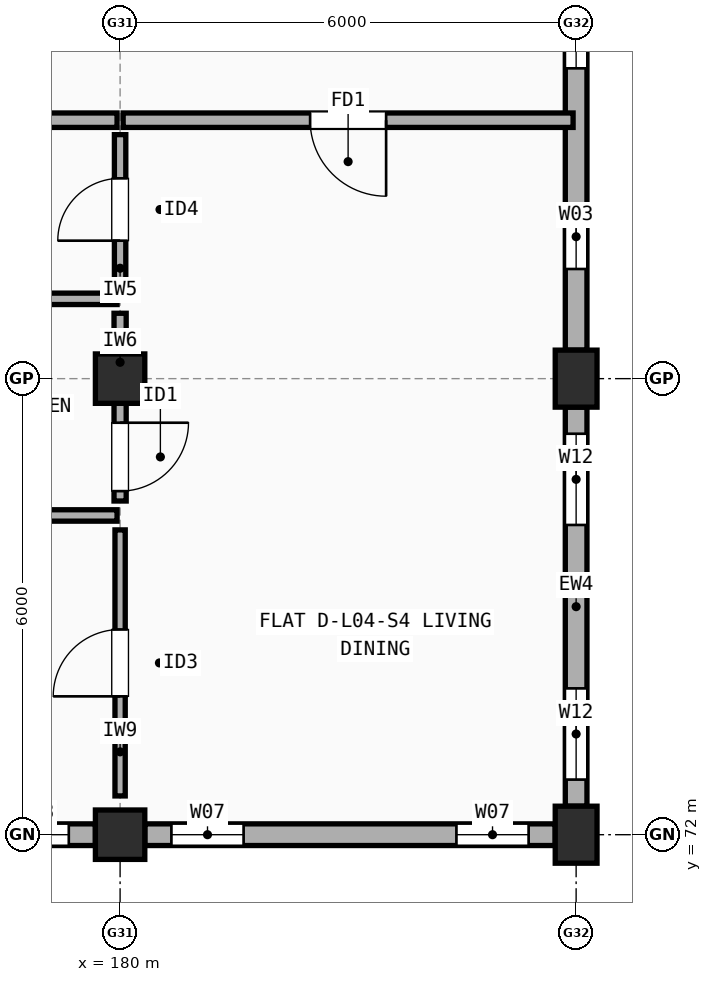
"""IFC4 building model, lengths in metres.
Left out: names, types, materials, properties, quantities, classifications, styles, units other than length and angle.
Written with IfcOpenShell. Run it as: python <this file> out.ifc"""

import sys

from ifc_helpers import new_model, si_unit, direction, frame, frame_2d, origin, origin_2d, place, context, subcontext, project, spatial, rectangle, extrude, element, fill, save


model = new_model("IFC4")
c1 = context("Model", 3, precision=1e-05, world=origin(), true_north=direction((0.0, 1.0)))
c2 = subcontext(c1, "Body", "Model", "MODEL_VIEW")
j1 = project(units=[si_unit("LENGTHUNIT", "METRE"), si_unit("PLANEANGLEUNIT", "RADIAN")], contexts=[c1])
p1 = place(None, origin())
s1 = spatial("IfcSite", under=j1, at=p1, CompositionType="ELEMENT")
p2 = place(p1, origin())
s2 = spatial("IfcBuilding", under=s1, at=p2, CompositionType="ELEMENT")
p3 = place(p2, frame((0.0, 0.0, 14.1)))
s3 = spatial("IfcBuildingStorey", under=s2, at=p3, CompositionType="ELEMENT", Elevation=14.1)
for number, where, z_axis, x_axis in (
    (1, (180.0, 72.0, 0.0), (0.0, 0.0, 1.0), (1.0, 0.0, 0.0)),
    (2, (180.0, 78.0, 0.0), (0.0, 0.0, 1.0), (1.0, 0.0, 0.0)),
):
    element("IfcColumn", number, at=place(p3, frame(where, z_axis=z_axis, x_axis=x_axis)), inside=s3, PredefinedType="COLUMN", context=c2, shape_type="SweptSolid", body=[
        extrude(rectangle(XDim=0.65, YDim=0.65, at=origin_2d()), origin(), (0.0, 0.0, 1.0), 2.95),
    ])
for number, where, z_axis, x_axis in (
    (3, (186.0, 72.0, 0.0), (0.0, 0.0, 1.0), (1.0, 0.0, 0.0)),
    (4, (186.0, 78.0, 0.0), (0.0, 0.0, 1.0), (1.0, 0.0, 0.0)),
):
    element("IfcColumn", number, at=place(p3, frame(where, z_axis=z_axis, x_axis=x_axis)), inside=s3, PredefinedType="COLUMN", context=c2, shape_type="SweptSolid", body=[
        extrude(rectangle(XDim=0.55, YDim=0.75, at=origin_2d()), origin(), (0.0, 0.0, 1.0), 2.95),
    ])
p4 = place(p3, frame((174.325, 72.0, 0.0), z_axis=(0.0, 0.0, 1.0), x_axis=(1.0, 0.0, 0.0)))
e5 = element("IfcWall", 5, at=p4, inside=s3, PredefinedType="STANDARD", context=c2, shape_type="SweptSolid", body=[
    extrude(rectangle(XDim=5.35, YDim=0.285, at=frame_2d((2.675, 0.0))), origin(), (0.0, 0.0, 1.0), 2.432),
])
p5 = place(p4, frame((1.565, 0.0, 0.9)))
e6 = element("IfcOpeningElement", 6, at=p5, cuts=e5, PredefinedType="OPENING", context=c2, shape_type="SweptSolid", body=[
    extrude(rectangle(XDim=0.85, YDim=1.25, at=frame_2d((0.425, 0.625))), frame((0.0, 0.152, 0.0), z_axis=(0.0, -1.0, 0.0), x_axis=(1.0, 0.0, 0.0)), (0.0, 0.0, 1.0), 0.305),
])
p6 = place(p4, frame((4.15, 0.0, 0.9)))
e7 = element("IfcOpeningElement", 7, at=p6, cuts=e5, PredefinedType="OPENING", context=c2, shape_type="SweptSolid", body=[
    extrude(rectangle(XDim=0.85, YDim=1.25, at=frame_2d((0.425, 0.625))), frame((0.0, 0.152, 0.0), z_axis=(0.0, -1.0, 0.0), x_axis=(1.0, 0.0, 0.0)), (0.0, 0.0, 1.0), 0.305),
])
p7 = place(p3, frame((180.325, 72.0, 0.0), z_axis=(0.0, 0.0, 1.0), x_axis=(1.0, 0.0, 0.0)))
e8 = element("IfcWall", 8, at=p7, inside=s3, PredefinedType="STANDARD", context=c2, shape_type="SweptSolid", body=[
    extrude(rectangle(XDim=5.4, YDim=0.285, at=frame_2d((2.7, 0.0))), origin(), (0.0, 0.0, 1.0), 2.432),
])
p8 = place(p7, frame((0.35, 0.0, 0.9)))
e9 = element("IfcOpeningElement", 9, at=p8, cuts=e8, PredefinedType="OPENING", context=c2, shape_type="SweptSolid", body=[
    extrude(rectangle(XDim=0.95, YDim=1.35, at=frame_2d((0.475, 0.675))), frame((0.0, 0.152, 0.0), z_axis=(0.0, -1.0, 0.0), x_axis=(1.0, 0.0, 0.0)), (0.0, 0.0, 1.0), 0.305),
])
p9 = place(p7, frame((4.1, 0.0, 0.9)))
e10 = element("IfcOpeningElement", 10, at=p9, cuts=e8, PredefinedType="OPENING", context=c2, shape_type="SweptSolid", body=[
    extrude(rectangle(XDim=0.95, YDim=1.35, at=frame_2d((0.475, 0.675))), frame((0.0, 0.152, 0.0), z_axis=(0.0, -1.0, 0.0), x_axis=(1.0, 0.0, 0.0)), (0.0, 0.0, 1.0), 0.305),
])
p10 = place(p3, frame((186.0, 72.375, 0.0), z_axis=(0.0, 0.0, 1.0), x_axis=(0.0, 1.0, 0.0)))
e11 = element("IfcWall", 11, at=p10, inside=s3, PredefinedType="STANDARD", context=c2, shape_type="SweptSolid", body=[
    extrude(rectangle(XDim=5.25, YDim=0.285, at=frame_2d((2.625, 0.0))), origin(), (0.0, 0.0, 1.0), 2.432),
])
p11 = place(p10, frame((0.35, 0.0, 0.9)))
e12 = element("IfcOpeningElement", 12, at=p11, cuts=e11, PredefinedType="OPENING", context=c2, shape_type="SweptSolid", body=[
    extrude(rectangle(XDim=1.2, YDim=1.35, at=frame_2d((0.6, 0.675))), frame((0.0, 0.152, 0.0), z_axis=(0.0, -1.0, 0.0), x_axis=(1.0, 0.0, 0.0)), (0.0, 0.0, 1.0), 0.305),
])
p12 = place(p10, frame((3.7, 0.0, 0.9)))
e13 = element("IfcOpeningElement", 13, at=p12, cuts=e11, PredefinedType="OPENING", context=c2, shape_type="SweptSolid", body=[
    extrude(rectangle(XDim=1.2, YDim=1.35, at=frame_2d((0.6, 0.675))), frame((0.0, 0.152, 0.0), z_axis=(0.0, -1.0, 0.0), x_axis=(1.0, 0.0, 0.0)), (0.0, 0.0, 1.0), 0.305),
])
p13 = place(p3, frame((186.0, 78.375, 0.0), z_axis=(0.0, 0.0, 1.0), x_axis=(0.0, 1.0, 0.0)))
e14 = element("IfcWall", 14, at=p13, inside=s3, PredefinedType="STANDARD", context=c2, shape_type="SweptSolid", body=[
    extrude(rectangle(XDim=5.25, YDim=0.285, at=frame_2d((2.625, 0.0))), origin(), (0.0, 0.0, 1.0), 2.432),
])
p14 = place(p13, frame((1.067, 0.0, 0.9)))
e15 = element("IfcOpeningElement", 15, at=p14, cuts=e14, PredefinedType="OPENING", context=c2, shape_type="SweptSolid", body=[
    extrude(rectangle(XDim=0.85, YDim=1.25, at=frame_2d((0.425, 0.625))), frame((0.0, 0.152, 0.0), z_axis=(0.0, -1.0, 0.0), x_axis=(1.0, 0.0, 0.0)), (0.0, 0.0, 1.0), 0.305),
])
p15 = place(p13, frame((3.708, 0.0, 0.9)))
e16 = element("IfcOpeningElement", 16, at=p15, cuts=e14, PredefinedType="OPENING", context=c2, shape_type="SweptSolid", body=[
    extrude(rectangle(XDim=0.9, YDim=1.3, at=frame_2d((0.45, 0.65))), frame((0.0, 0.152, 0.0), z_axis=(0.0, -1.0, 0.0), x_axis=(1.0, 0.0, 0.0)), (0.0, 0.0, 1.0), 0.305),
])
p16 = place(p3, frame((175.54, 81.4, 0.0), z_axis=(0.0, 0.0, 1.0), x_axis=(1.0, 0.0, 0.0)))
e17 = element("IfcWall", 17, at=p16, inside=s3, PredefinedType="SOLIDWALL", context=c2, shape_type="SweptSolid", body=[
    extrude(rectangle(XDim=4.42, YDim=0.19, at=frame_2d((2.21, 0.0))), origin(), (0.0, 0.0, 1.0), 2.458),
])
p17 = place(p3, frame((180.04, 81.4, 0.0), z_axis=(0.0, 0.0, 1.0), x_axis=(1.0, 0.0, 0.0)))
e18 = element("IfcWall", 18, at=p17, inside=s3, PredefinedType="SOLIDWALL", context=c2, shape_type="SweptSolid", body=[
    extrude(rectangle(XDim=5.92, YDim=0.19, at=frame_2d((2.96, 0.0))), origin(), (0.0, 0.0, 1.0), 2.432),
])
p18 = place(p17, frame((2.46, 0.0, 0.0)))
e19 = element("IfcOpeningElement", 19, at=p18, cuts=e18, PredefinedType="OPENING", context=c2, shape_type="SweptSolid", body=[
    extrude(rectangle(XDim=1.0, YDim=2.15, at=frame_2d((0.5, 1.075))), frame((0.0, 0.105, 0.0), z_axis=(0.0, -1.0, 0.0), x_axis=(1.0, 0.0, 0.0)), (0.0, 0.0, 1.0), 0.21),
])
p19 = place(p3, frame((180.0, 72.51, 0.0), z_axis=(0.0, 0.0, 1.0), x_axis=(0.0, 1.0, 0.0)))
e20 = element("IfcWall", 20, at=p19, inside=s3, PredefinedType="PARTITIONING", context=c2, shape_type="SweptSolid", body=[
    extrude(rectangle(XDim=3.5, YDim=0.135, at=frame_2d((1.75, 0.0))), origin(), (0.0, 0.0, 1.0), 2.508),
])
p20 = place(p19, frame((1.31, 0.0, 0.0)))
e21 = element("IfcOpeningElement", 21, at=p20, cuts=e20, PredefinedType="OPENING", context=c2, shape_type="SweptSolid", body=[
    extrude(rectangle(XDim=0.88, YDim=2.1, at=frame_2d((0.44, 1.05))), frame((0.0, 0.077, 0.0), z_axis=(0.0, -1.0, 0.0), x_axis=(1.0, 0.0, 0.0)), (0.0, 0.0, 1.0), 0.155),
])
p21 = place(p3, frame((180.0, 76.39, 0.0), z_axis=(0.0, 0.0, 1.0), x_axis=(0.0, 1.0, 0.0)))
e22 = element("IfcWall", 22, at=p21, inside=s3, PredefinedType="PLUMBINGWALL", context=c2, shape_type="SweptSolid", body=[
    extrude(rectangle(XDim=2.47, YDim=0.16, at=frame_2d((1.235, 0.0))), origin(), (0.0, 0.0, 1.0), 2.458),
])
p22 = place(p21, frame((0.13, 0.0, 0.0)))
e23 = element("IfcOpeningElement", 23, at=p22, cuts=e22, PredefinedType="OPENING", context=c2, shape_type="SweptSolid", body=[
    extrude(rectangle(XDim=0.9, YDim=2.1, at=frame_2d((0.45, 1.05))), frame((0.0, 0.09, 0.0), z_axis=(0.0, -1.0, 0.0), x_axis=(1.0, 0.0, 0.0)), (0.0, 0.0, 1.0), 0.18),
])
p23 = place(p3, frame((180.0, 79.24, 0.0), z_axis=(0.0, 0.0, 1.0), x_axis=(0.0, 1.0, 0.0)))
e24 = element("IfcWall", 24, at=p23, inside=s3, PredefinedType="PARTITIONING", context=c2, shape_type="SweptSolid", body=[
    extrude(rectangle(XDim=1.97, YDim=0.15, at=frame_2d((0.985, 0.0))), origin(), (0.0, 0.0, 1.0), 2.458),
])
p24 = place(p23, frame((0.575, 0.0, 0.0)))
e25 = element("IfcOpeningElement", 25, at=p24, cuts=e24, PredefinedType="OPENING", context=c2, shape_type="SweptSolid", body=[
    extrude(rectangle(XDim=0.82, YDim=2.08, at=frame_2d((0.41, 1.04))), frame((0.0, 0.085, 0.0), z_axis=(0.0, -1.0, 0.0), x_axis=(1.0, 0.0, 0.0)), (0.0, 0.0, 1.0), 0.17),
])
p25 = place(p3, frame((175.54, 76.2, 0.0), z_axis=(0.0, 0.0, 1.0), x_axis=(1.0, 0.0, 0.0)))
e26 = element("IfcWall", 26, at=p25, inside=s3, PredefinedType="PARTITIONING", context=c2, shape_type="SweptSolid", body=[
    extrude(rectangle(XDim=4.42, YDim=0.15, at=frame_2d((2.21, 0.0))), origin(), (0.0, 0.0, 1.0), 2.508),
])
p26 = place(p3, frame((175.54, 79.05, 0.0), z_axis=(0.0, 0.0, 1.0), x_axis=(1.0, 0.0, 0.0)))
e27 = element("IfcWall", 27, at=p26, inside=s3, PredefinedType="PARTITIONING", context=c2, shape_type="SweptSolid", body=[
    extrude(rectangle(XDim=4.42, YDim=0.15, at=frame_2d((2.21, 0.0))), origin(), (0.0, 0.0, 1.0), 2.458),
])
p27 = place(p6, origin())
e28 = element("IfcWindow", 28, at=p27, inside=s3, PartitioningType="SINGLE_PANEL", PredefinedType="WINDOW", context=c2, shape_type="SweptSolid", body=[
    extrude(rectangle(XDim=0.85, YDim=1.25, at=frame_2d((0.425, 0.625))), frame((0.0, 0.03, 0.0), z_axis=(0.0, -1.0, 0.0), x_axis=(1.0, 0.0, 0.0)), (0.0, 0.0, 1.0), 0.06),
])
fill(e7, e28)
p28 = place(p8, origin())
e29 = element("IfcWindow", 29, at=p28, inside=s3, PartitioningType="SINGLE_PANEL", PredefinedType="WINDOW", context=c2, shape_type="SweptSolid", body=[
    extrude(rectangle(XDim=0.95, YDim=1.35, at=frame_2d((0.475, 0.675))), frame((0.0, 0.03, 0.0), z_axis=(0.0, -1.0, 0.0), x_axis=(1.0, 0.0, 0.0)), (0.0, 0.0, 1.0), 0.06),
])
fill(e9, e29)
p29 = place(p9, origin())
e30 = element("IfcWindow", 30, at=p29, inside=s3, PartitioningType="SINGLE_PANEL", PredefinedType="WINDOW", context=c2, shape_type="SweptSolid", body=[
    extrude(rectangle(XDim=0.95, YDim=1.35, at=frame_2d((0.475, 0.675))), frame((0.0, 0.03, 0.0), z_axis=(0.0, -1.0, 0.0), x_axis=(1.0, 0.0, 0.0)), (0.0, 0.0, 1.0), 0.06),
])
fill(e10, e30)
p30 = place(p11, origin())
e31 = element("IfcWindow", 31, at=p30, inside=s3, PartitioningType="SINGLE_PANEL", PredefinedType="WINDOW", context=c2, shape_type="SweptSolid", body=[
    extrude(rectangle(XDim=1.2, YDim=1.35, at=frame_2d((0.6, 0.675))), frame((0.0, 0.03, 0.0), z_axis=(0.0, -1.0, 0.0), x_axis=(1.0, 0.0, 0.0)), (0.0, 0.0, 1.0), 0.06),
])
fill(e12, e31)
p31 = place(p12, origin())
e32 = element("IfcWindow", 32, at=p31, inside=s3, PartitioningType="SINGLE_PANEL", PredefinedType="WINDOW", context=c2, shape_type="SweptSolid", body=[
    extrude(rectangle(XDim=1.2, YDim=1.35, at=frame_2d((0.6, 0.675))), frame((0.0, 0.03, 0.0), z_axis=(0.0, -1.0, 0.0), x_axis=(1.0, 0.0, 0.0)), (0.0, 0.0, 1.0), 0.06),
])
fill(e13, e32)
p32 = place(p14, origin())
e33 = element("IfcWindow", 33, at=p32, inside=s3, PartitioningType="SINGLE_PANEL", PredefinedType="WINDOW", context=c2, shape_type="SweptSolid", body=[
    extrude(rectangle(XDim=0.85, YDim=1.25, at=frame_2d((0.425, 0.625))), frame((0.0, 0.03, 0.0), z_axis=(0.0, -1.0, 0.0), x_axis=(1.0, 0.0, 0.0)), (0.0, 0.0, 1.0), 0.06),
])
fill(e15, e33)
p33 = place(p15, origin())
e34 = element("IfcWindow", 34, at=p33, inside=s3, PartitioningType="SINGLE_PANEL", PredefinedType="WINDOW", context=c2, shape_type="SweptSolid", body=[
    extrude(rectangle(XDim=0.9, YDim=1.3, at=frame_2d((0.45, 0.65))), frame((0.0, 0.03, 0.0), z_axis=(0.0, -1.0, 0.0), x_axis=(1.0, 0.0, 0.0)), (0.0, 0.0, 1.0), 0.06),
])
fill(e16, e34)
p34 = place(p18, origin())
e35 = element("IfcDoor", 35, at=p34, inside=s3, OperationType="SINGLE_SWING_RIGHT", PredefinedType="DOOR", context=c2, shape_type="SweptSolid", body=[
    extrude(rectangle(XDim=1.0, YDim=2.15, at=frame_2d((0.5, 1.075))), frame((0.0, 0.025, 0.0), z_axis=(0.0, -1.0, 0.0), x_axis=(1.0, 0.0, 0.0)), (0.0, 0.0, 1.0), 0.05),
])
fill(e19, e35)
p35 = place(p20, origin())
e36 = element("IfcDoor", 36, at=p35, inside=s3, OperationType="SINGLE_SWING_LEFT", PredefinedType="DOOR", context=c2, shape_type="SweptSolid", body=[
    extrude(rectangle(XDim=0.88, YDim=2.1, at=frame_2d((0.44, 1.05))), frame((0.0, 0.025, 0.0), z_axis=(0.0, -1.0, 0.0), x_axis=(1.0, 0.0, 0.0)), (0.0, 0.0, 1.0), 0.05),
])
fill(e21, e36)
p36 = place(p22, origin())
e37 = element("IfcDoor", 37, at=p36, inside=s3, OperationType="SINGLE_SWING_RIGHT", PredefinedType="DOOR", context=c2, shape_type="SweptSolid", body=[
    extrude(rectangle(XDim=0.9, YDim=2.1, at=frame_2d((0.45, 1.05))), frame((0.0, 0.025, 0.0), z_axis=(0.0, -1.0, 0.0), x_axis=(1.0, 0.0, 0.0)), (0.0, 0.0, 1.0), 0.05),
])
fill(e23, e37)
p37 = place(p24, origin())
e38 = element("IfcDoor", 38, at=p37, inside=s3, OperationType="SINGLE_SWING_LEFT", PredefinedType="DOOR", context=c2, shape_type="SweptSolid", body=[
    extrude(rectangle(XDim=0.82, YDim=2.08, at=frame_2d((0.41, 1.04))), frame((0.0, 0.025, 0.0), z_axis=(0.0, -1.0, 0.0), x_axis=(1.0, 0.0, 0.0)), (0.0, 0.0, 1.0), 0.05),
])
fill(e25, e38)
save(model, sys.argv[1])
